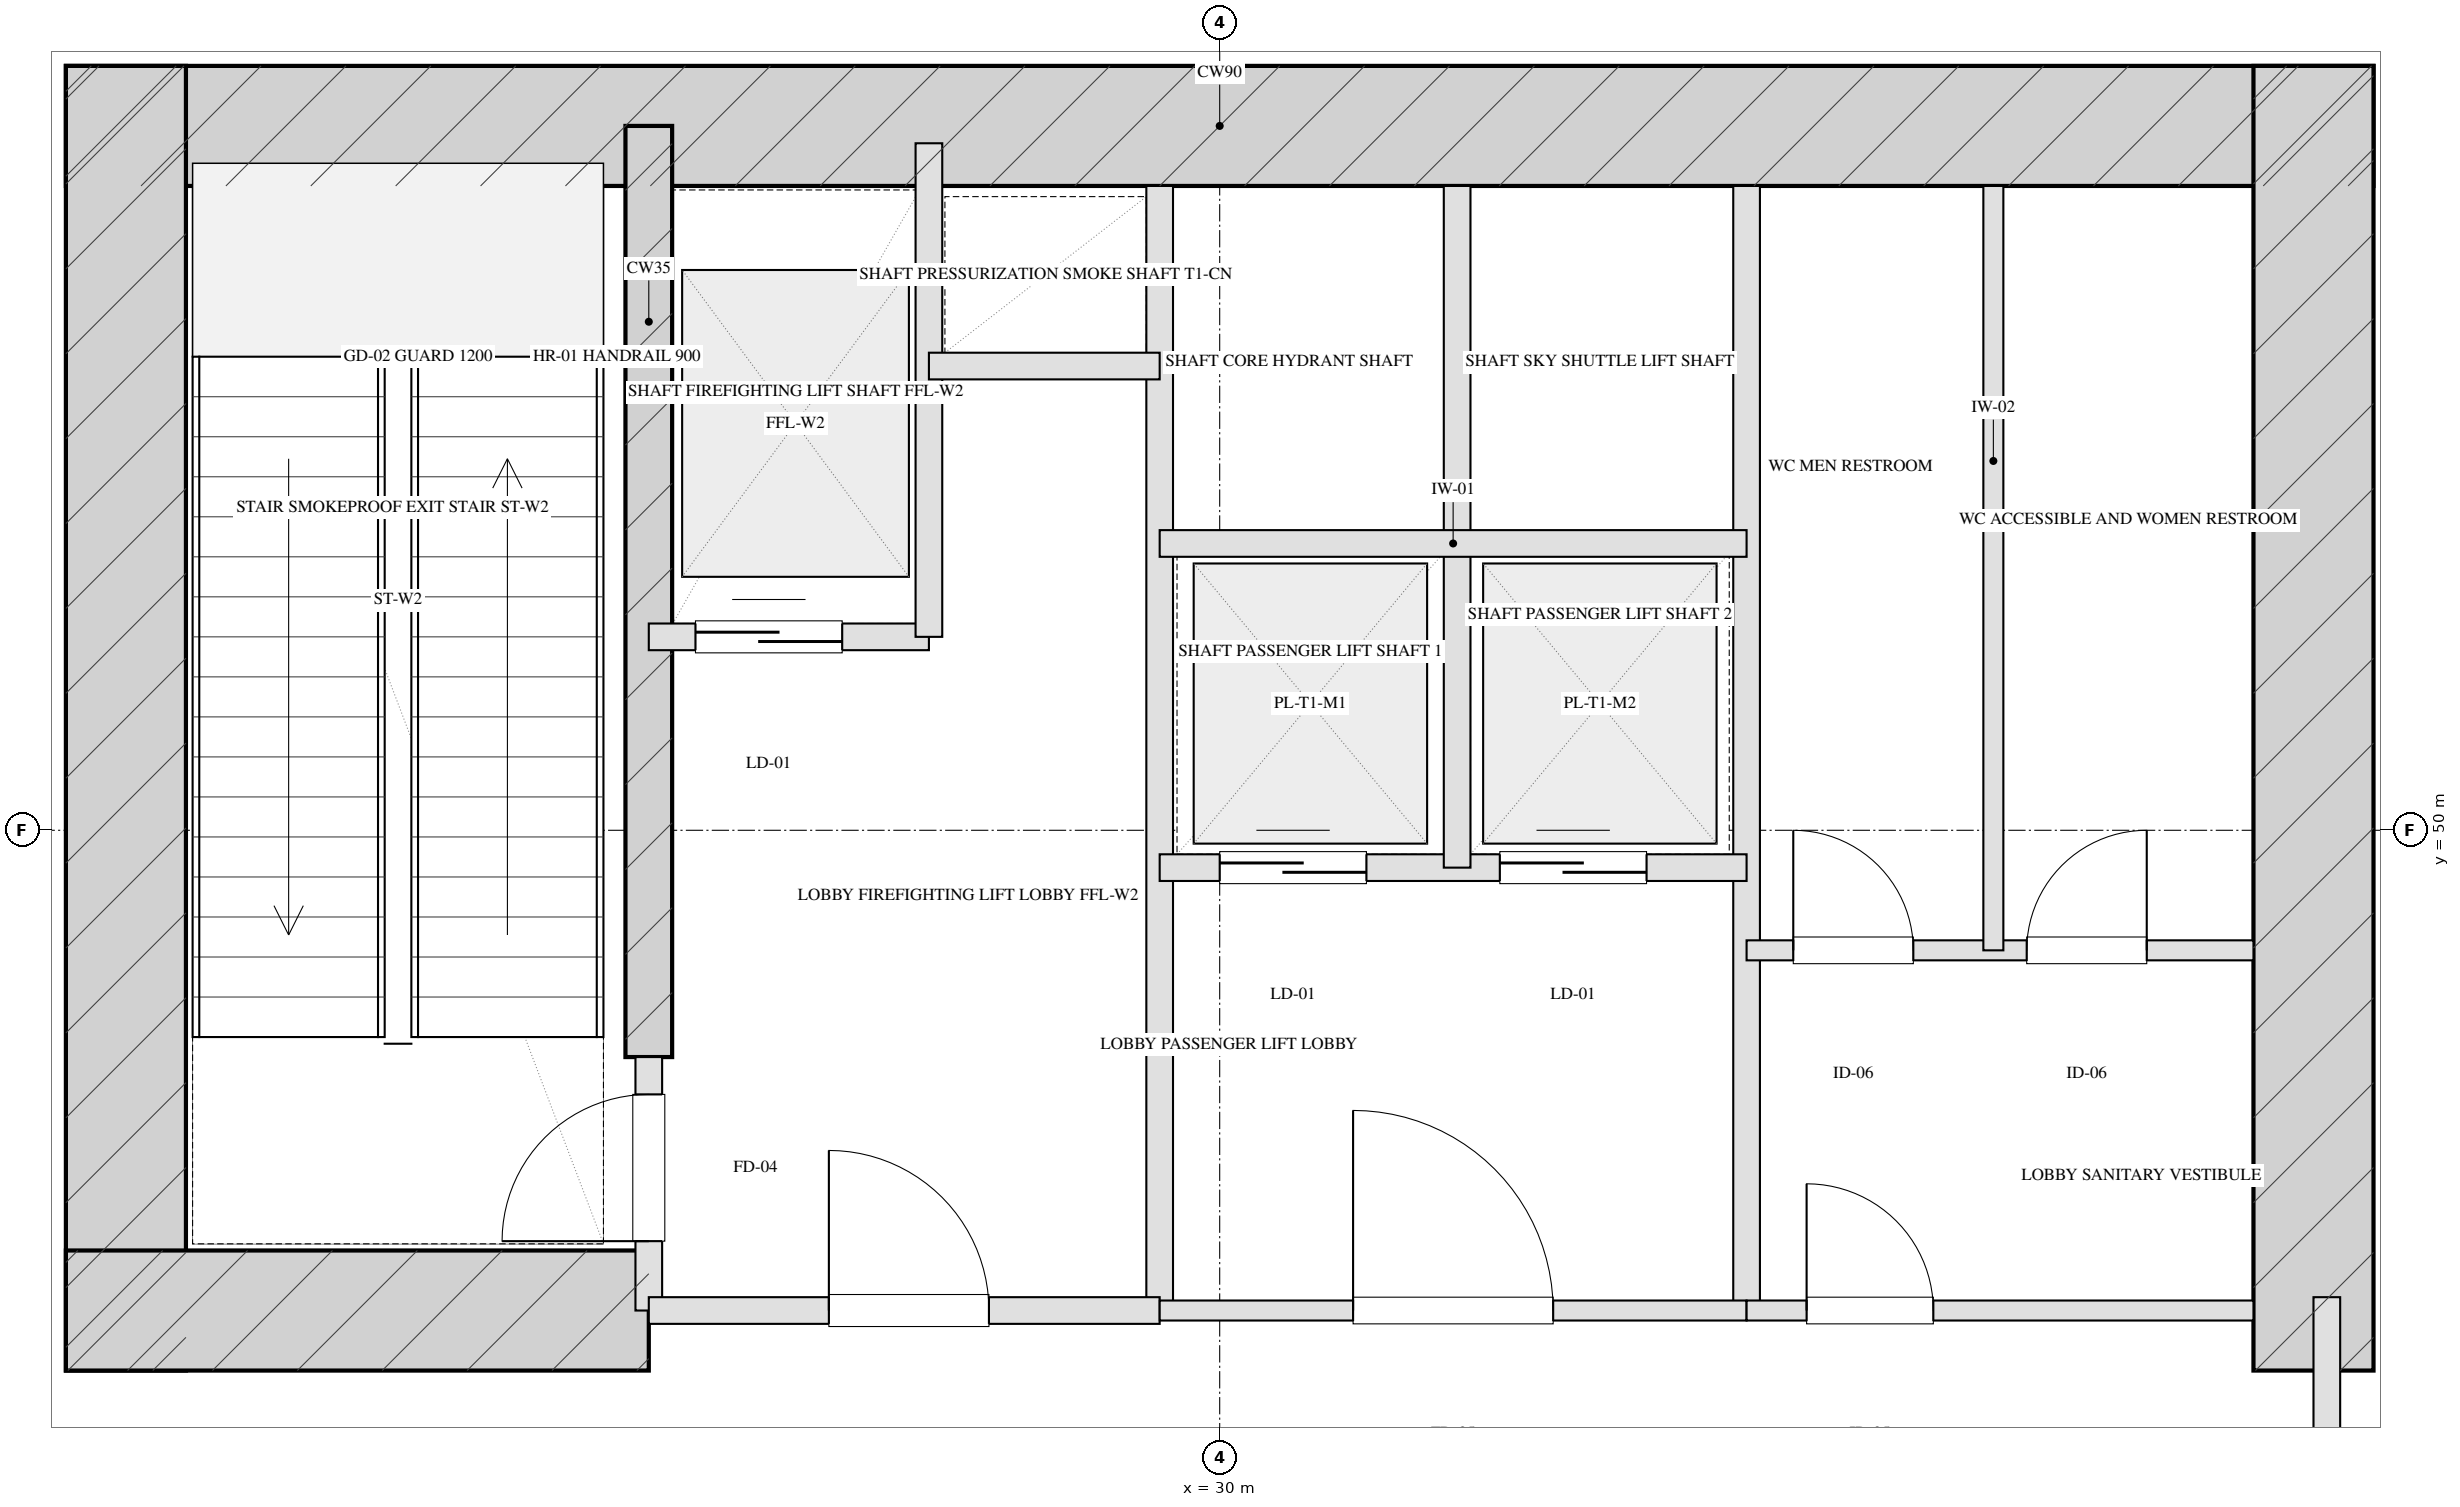
"""IFC4 building model, lengths in metres.
Left out: names, types, materials, properties, quantities, classifications, styles, units other than length and angle.
Written with IfcOpenShell. Run it as: python <this file> out.ifc"""

import sys

from ifc_helpers import new_model, si_unit, direction, frame, frame_2d, origin, place, context, subcontext, project, spatial, rectangle, extrude, element, fill, save


model = new_model("IFC4")
c1 = context("Model", 3, precision=1e-05, world=origin(), true_north=direction((0.0, 1.0)))
c2 = subcontext(c1, "Body", "Model", "MODEL_VIEW")
j1 = project(units=[si_unit("LENGTHUNIT", "METRE"), si_unit("PLANEANGLEUNIT", "RADIAN")], contexts=[c1])
p1 = place(None, origin())
s1 = spatial("IfcSite", under=j1, at=p1, CompositionType="ELEMENT")
p2 = place(p1, origin())
s2 = spatial("IfcBuilding", under=s1, at=p2, CompositionType="ELEMENT")
p3 = place(p2, origin())
s3 = spatial("IfcBuildingStorey", under=s2, at=p3, CompositionType="ELEMENT", Elevation=0.0)
p4 = place(p3, frame((21.35, 55.28, 0.0), z_axis=(0.0, 0.0, 1.0), x_axis=(1.0, 0.0, 0.0)))
e1 = element("IfcWall", 1, at=p4, inside=s3, PredefinedType="SHEAR", context=c2, shape_type="SweptSolid", body=[
    extrude(rectangle(XDim=17.3, YDim=0.9, at=frame_2d((8.65, 0.0))), origin(), (0.0, 0.0, 1.0), 6.0),
])
for number, where, z_axis, x_axis in (
    (2, (21.8, 45.95, 0.0), (0.0, 0.0, 1.0), (0.0, 1.0, 0.0)),
    (3, (38.2, 45.95, 0.0), (0.0, 0.0, 1.0), (0.0, 1.0, 0.0)),
):
    element("IfcWall", number, at=place(p3, frame(where, z_axis=z_axis, x_axis=x_axis)), inside=s3, PredefinedType="SHEAR", context=c2, shape_type="SweptSolid", body=[
        extrude(rectangle(XDim=9.78, YDim=0.9, at=frame_2d((4.89, 0.0))), origin(), (0.0, 0.0, 1.0), 6.0),
    ])
p5 = place(p3, frame((25.72, 48.3, 0.0), z_axis=(0.0, 0.0, 1.0), x_axis=(0.0, 1.0, 0.0)))
e4 = element("IfcWall", 4, at=p5, inside=s3, PredefinedType="SHEAR", context=c2, shape_type="SweptSolid", body=[
    extrude(rectangle(XDim=6.98, YDim=0.35, at=frame_2d((3.49, 0.0))), origin(), (0.0, 0.0, 1.0), 6.0),
])
p6 = place(p3, frame((21.35, 46.4, 0.0), z_axis=(0.0, 0.0, 1.0), x_axis=(1.0, 0.0, 0.0)))
e5 = element("IfcWall", 5, at=p6, inside=s3, PredefinedType="SHEAR", context=c2, shape_type="SweptSolid", body=[
    extrude(rectangle(XDim=4.37, YDim=0.9, at=frame_2d((2.185, 0.0))), origin(), (0.0, 0.0, 1.0), 6.0),
])
p7 = place(p3, frame((25.72, 46.4, 0.0), z_axis=(0.0, 0.0, 1.0), x_axis=(0.0, 1.0, 0.0)))
e6 = element("IfcWall", 6, at=p7, inside=s3, PredefinedType="PARTITIONING", context=c2, shape_type="SweptSolid", body=[
    extrude(rectangle(XDim=1.9, YDim=0.2, at=frame_2d((0.95, 0.0))), origin(), (0.0, 0.0, 1.0), 5.685),
])
p8 = place(p7, frame((0.52, 0.0, 0.0)))
e7 = element("IfcOpeningElement", 7, at=p8, cuts=e6, PredefinedType="OPENING", context=c2, shape_type="SweptSolid", body=[
    extrude(rectangle(XDim=1.1, YDim=2.05, at=frame_2d((0.55, 1.025))), frame((0.0, 0.11, 0.0), z_axis=(0.0, -1.0, 0.0), x_axis=(1.0, 0.0, 0.0)), (0.0, 0.0, 1.0), 0.22),
])
p9 = place(p3, frame((29.55, 46.4, 0.0), z_axis=(0.0, 0.0, 1.0), x_axis=(0.0, 1.0, 0.0)))
e8 = element("IfcWall", 8, at=p9, inside=s3, PredefinedType="PARTITIONING", context=c2, shape_type="SweptSolid", body=[
    extrude(rectangle(XDim=8.43, YDim=0.2, at=frame_2d((4.215, 0.0))), origin(), (0.0, 0.0, 1.0), 5.685),
])
p10 = place(p3, frame((25.72, 46.4, 0.0), z_axis=(0.0, 0.0, 1.0), x_axis=(1.0, 0.0, 0.0)))
e9 = element("IfcWall", 9, at=p10, inside=s3, PredefinedType="PARTITIONING", context=c2, shape_type="SweptSolid", body=[
    extrude(rectangle(XDim=3.83, YDim=0.2, at=frame_2d((1.915, 0.0))), origin(), (0.0, 0.0, 1.0), 5.685),
])
p11 = place(p10, frame((1.35, 0.0, 0.0)))
e10 = element("IfcOpeningElement", 10, at=p11, cuts=e9, PredefinedType="OPENING", context=c2, shape_type="SweptSolid", body=[
    extrude(rectangle(XDim=1.2, YDim=2.05, at=frame_2d((0.6, 1.025))), frame((0.0, 0.11, 0.0), z_axis=(0.0, -1.0, 0.0), x_axis=(1.0, 0.0, 0.0)), (0.0, 0.0, 1.0), 0.22),
])
p12 = place(p3, frame((25.72, 51.45, 0.0), z_axis=(0.0, 0.0, 1.0), x_axis=(1.0, 0.0, 0.0)))
e11 = element("IfcWall", 11, at=p12, inside=s3, PredefinedType="PARTITIONING", context=c2, shape_type="SweptSolid", body=[
    extrude(rectangle(XDim=2.1, YDim=0.2, at=frame_2d((1.05, 0.0))), origin(), (0.0, 0.0, 1.0), 5.685),
])
p13 = place(p12, frame((0.35, 0.0, 0.0)))
e12 = element("IfcOpeningElement", 12, at=p13, cuts=e11, PredefinedType="OPENING", context=c2, shape_type="SweptSolid", body=[
    extrude(rectangle(XDim=1.1, YDim=2.05, at=frame_2d((0.55, 1.025))), frame((0.0, 0.11, 0.0), z_axis=(0.0, -1.0, 0.0), x_axis=(1.0, 0.0, 0.0)), (0.0, 0.0, 1.0), 0.22),
])
p14 = place(p3, frame((27.82, 51.45, 0.0), z_axis=(0.0, 0.0, 1.0), x_axis=(0.0, 1.0, 0.0)))
e13 = element("IfcWall", 13, at=p14, inside=s3, PredefinedType="PARTITIONING", context=c2, shape_type="SweptSolid", body=[
    extrude(rectangle(XDim=3.7, YDim=0.2, at=frame_2d((1.85, 0.0))), origin(), (0.0, 0.0, 1.0), 5.685),
])
p15 = place(p3, frame((27.82, 53.48, 0.0), z_axis=(0.0, 0.0, 1.0), x_axis=(1.0, 0.0, 0.0)))
e14 = element("IfcWall", 14, at=p15, inside=s3, PredefinedType="PARTITIONING", context=c2, shape_type="SweptSolid", body=[
    extrude(rectangle(XDim=1.73, YDim=0.2, at=frame_2d((0.865, 0.0))), origin(), (0.0, 0.0, 1.0), 5.685),
])
p16 = place(p3, frame((33.95, 46.4, 0.0), z_axis=(0.0, 0.0, 1.0), x_axis=(0.0, 1.0, 0.0)))
e15 = element("IfcWall", 15, at=p16, inside=s3, PredefinedType="PARTITIONING", context=c2, shape_type="SweptSolid", body=[
    extrude(rectangle(XDim=8.43, YDim=0.2, at=frame_2d((4.215, 0.0))), origin(), (0.0, 0.0, 1.0), 5.685),
])
p17 = place(p3, frame((29.55, 46.4, 0.0), z_axis=(0.0, 0.0, 1.0), x_axis=(1.0, 0.0, 0.0)))
e16 = element("IfcWall", 16, at=p17, inside=s3, PredefinedType="PARTITIONING", context=c2, shape_type="SweptSolid", body=[
    extrude(rectangle(XDim=4.4, YDim=0.15, at=frame_2d((2.2, 0.0))), origin(), (0.0, 0.0, 1.0), 5.685),
])
p18 = place(p17, frame((1.45, 0.0, 0.0)))
e17 = element("IfcOpeningElement", 17, at=p18, cuts=e16, PredefinedType="OPENING", context=c2, shape_type="SweptSolid", body=[
    extrude(rectangle(XDim=1.5, YDim=2.05, at=frame_2d((0.75, 1.025))), frame((0.0, 0.085, 0.0), z_axis=(0.0, -1.0, 0.0), x_axis=(1.0, 0.0, 0.0)), (0.0, 0.0, 1.0), 0.17),
])
p19 = place(p3, frame((29.55, 49.72, 0.0), z_axis=(0.0, 0.0, 1.0), x_axis=(1.0, 0.0, 0.0)))
e18 = element("IfcWall", 18, at=p19, inside=s3, PredefinedType="PARTITIONING", context=c2, shape_type="SweptSolid", body=[
    extrude(rectangle(XDim=4.4, YDim=0.2, at=frame_2d((2.2, 0.0))), origin(), (0.0, 0.0, 1.0), 5.685),
])
p20 = place(p19, frame((0.45, 0.0, 0.0)))
e19 = element("IfcOpeningElement", 19, at=p20, cuts=e18, PredefinedType="OPENING", context=c2, shape_type="SweptSolid", body=[
    extrude(rectangle(XDim=1.1, YDim=2.05, at=frame_2d((0.55, 1.025))), frame((0.0, 0.11, 0.0), z_axis=(0.0, -1.0, 0.0), x_axis=(1.0, 0.0, 0.0)), (0.0, 0.0, 1.0), 0.22),
])
p21 = place(p19, frame((2.55, 0.0, 0.0)))
e20 = element("IfcOpeningElement", 20, at=p21, cuts=e18, PredefinedType="OPENING", context=c2, shape_type="SweptSolid", body=[
    extrude(rectangle(XDim=1.1, YDim=2.05, at=frame_2d((0.55, 1.025))), frame((0.0, 0.11, 0.0), z_axis=(0.0, -1.0, 0.0), x_axis=(1.0, 0.0, 0.0)), (0.0, 0.0, 1.0), 0.22),
])
p22 = place(p3, frame((31.78, 49.72, 0.0), z_axis=(0.0, 0.0, 1.0), x_axis=(0.0, 1.0, 0.0)))
e21 = element("IfcWall", 21, at=p22, inside=s3, PredefinedType="PARTITIONING", context=c2, shape_type="SweptSolid", body=[
    extrude(rectangle(XDim=5.11, YDim=0.2, at=frame_2d((2.555, 0.0))), origin(), (0.0, 0.0, 1.0), 5.685),
])
p23 = place(p3, frame((29.55, 52.15, 0.0), z_axis=(0.0, 0.0, 1.0), x_axis=(1.0, 0.0, 0.0)))
e22 = element("IfcWall", 22, at=p23, inside=s3, PredefinedType="PARTITIONING", context=c2, shape_type="SweptSolid", body=[
    extrude(rectangle(XDim=4.4, YDim=0.2, at=frame_2d((2.2, 0.0))), origin(), (0.0, 0.0, 1.0), 5.685),
])
p24 = place(p3, frame((33.95, 46.4, 0.0), z_axis=(0.0, 0.0, 1.0), x_axis=(1.0, 0.0, 0.0)))
e23 = element("IfcWall", 23, at=p24, inside=s3, PredefinedType="PARTITIONING", context=c2, shape_type="SweptSolid", body=[
    extrude(rectangle(XDim=3.8, YDim=0.15, at=frame_2d((1.9, 0.0))), origin(), (0.0, 0.0, 1.0), 5.685),
])
p25 = place(p24, frame((0.45, 0.0, 0.0)))
e24 = element("IfcOpeningElement", 24, at=p25, cuts=e23, PredefinedType="OPENING", context=c2, shape_type="SweptSolid", body=[
    extrude(rectangle(XDim=0.95, YDim=2.05, at=frame_2d((0.475, 1.025))), frame((0.0, 0.085, 0.0), z_axis=(0.0, -1.0, 0.0), x_axis=(1.0, 0.0, 0.0)), (0.0, 0.0, 1.0), 0.17),
])
p26 = place(p3, frame((33.95, 49.1, 0.0), z_axis=(0.0, 0.0, 1.0), x_axis=(1.0, 0.0, 0.0)))
e25 = element("IfcWall", 25, at=p26, inside=s3, PredefinedType="PARTITIONING", context=c2, shape_type="SweptSolid", body=[
    extrude(rectangle(XDim=3.8, YDim=0.15, at=frame_2d((1.9, 0.0))), origin(), (0.0, 0.0, 1.0), 5.685),
])
p27 = place(p26, frame((0.35, 0.0, 0.0)))
e26 = element("IfcOpeningElement", 26, at=p27, cuts=e25, PredefinedType="OPENING", context=c2, shape_type="SweptSolid", body=[
    extrude(rectangle(XDim=0.9, YDim=2.05, at=frame_2d((0.45, 1.025))), frame((0.0, 0.085, 0.0), z_axis=(0.0, -1.0, 0.0), x_axis=(1.0, 0.0, 0.0)), (0.0, 0.0, 1.0), 0.17),
])
p28 = place(p26, frame((2.1, 0.0, 0.0)))
e27 = element("IfcOpeningElement", 27, at=p28, cuts=e25, PredefinedType="OPENING", context=c2, shape_type="SweptSolid", body=[
    extrude(rectangle(XDim=0.9, YDim=2.05, at=frame_2d((0.45, 1.025))), frame((0.0, 0.085, 0.0), z_axis=(0.0, -1.0, 0.0), x_axis=(1.0, 0.0, 0.0)), (0.0, 0.0, 1.0), 0.17),
])
p29 = place(p3, frame((35.8, 49.1, 0.0), z_axis=(0.0, 0.0, 1.0), x_axis=(0.0, 1.0, 0.0)))
e28 = element("IfcWall", 28, at=p29, inside=s3, PredefinedType="PARTITIONING", context=c2, shape_type="SweptSolid", body=[
    extrude(rectangle(XDim=5.73, YDim=0.15, at=frame_2d((2.865, 0.0))), origin(), (0.0, 0.0, 1.0), 5.685),
])
p30 = place(p3, frame((38.3, 43.75, 0.0), z_axis=(0.0, 0.0, 1.0), x_axis=(0.0, 1.0, 0.0)))
e29 = element("IfcWall", 29, at=p30, inside=s3, PredefinedType="PARTITIONING", context=c2, shape_type="SweptSolid", body=[
    extrude(rectangle(XDim=2.75, YDim=0.2, at=frame_2d((1.375, 0.0))), origin(), (0.0, 0.0, 1.0), 5.685),
])
p31 = place(p8, origin())
e30 = element("IfcDoor", 30, at=p31, inside=s3, OperationType="SINGLE_SWING_LEFT", PredefinedType="DOOR", context=c2, shape_type="SweptSolid", body=[
    extrude(rectangle(XDim=1.1, YDim=2.05, at=frame_2d((0.55, 1.025))), frame((0.0, 0.025, 0.0), z_axis=(0.0, -1.0, 0.0), x_axis=(1.0, 0.0, 0.0)), (0.0, 0.0, 1.0), 0.05),
])
fill(e7, e30)
p32 = place(p11, origin())
e31 = element("IfcDoor", 31, at=p32, inside=s3, OperationType="SINGLE_SWING_LEFT", PredefinedType="DOOR", context=c2, shape_type="SweptSolid", body=[
    extrude(rectangle(XDim=1.2, YDim=2.05, at=frame_2d((0.6, 1.025))), frame((0.0, 0.025, 0.0), z_axis=(0.0, -1.0, 0.0), x_axis=(1.0, 0.0, 0.0)), (0.0, 0.0, 1.0), 0.05),
])
fill(e10, e31)
p33 = place(p13, origin())
e32 = element("IfcDoor", 32, at=p33, inside=s3, OperationType="DOUBLE_DOOR_SLIDING", PredefinedType="DOOR", context=c2, shape_type="SweptSolid", body=[
    extrude(rectangle(XDim=1.1, YDim=2.05, at=frame_2d((0.55, 1.025))), frame((0.0, 0.025, 0.0), z_axis=(0.0, -1.0, 0.0), x_axis=(1.0, 0.0, 0.0)), (0.0, 0.0, 1.0), 0.05),
])
fill(e12, e32)
p34 = place(p18, origin())
e33 = element("IfcDoor", 33, at=p34, inside=s3, OperationType="SINGLE_SWING_LEFT", PredefinedType="DOOR", context=c2, shape_type="SweptSolid", body=[
    extrude(rectangle(XDim=1.5, YDim=2.05, at=frame_2d((0.75, 1.025))), frame((0.0, 0.025, 0.0), z_axis=(0.0, -1.0, 0.0), x_axis=(1.0, 0.0, 0.0)), (0.0, 0.0, 1.0), 0.05),
])
fill(e17, e33)
p35 = place(p20, origin())
e34 = element("IfcDoor", 34, at=p35, inside=s3, OperationType="DOUBLE_DOOR_SLIDING", PredefinedType="DOOR", context=c2, shape_type="SweptSolid", body=[
    extrude(rectangle(XDim=1.1, YDim=2.05, at=frame_2d((0.55, 1.025))), frame((0.0, 0.025, 0.0), z_axis=(0.0, -1.0, 0.0), x_axis=(1.0, 0.0, 0.0)), (0.0, 0.0, 1.0), 0.05),
])
fill(e19, e34)
p36 = place(p21, origin())
e35 = element("IfcDoor", 35, at=p36, inside=s3, OperationType="DOUBLE_DOOR_SLIDING", PredefinedType="DOOR", context=c2, shape_type="SweptSolid", body=[
    extrude(rectangle(XDim=1.1, YDim=2.05, at=frame_2d((0.55, 1.025))), frame((0.0, 0.025, 0.0), z_axis=(0.0, -1.0, 0.0), x_axis=(1.0, 0.0, 0.0)), (0.0, 0.0, 1.0), 0.05),
])
fill(e20, e35)
p37 = place(p25, origin())
e36 = element("IfcDoor", 36, at=p37, inside=s3, OperationType="SINGLE_SWING_LEFT", PredefinedType="DOOR", context=c2, shape_type="SweptSolid", body=[
    extrude(rectangle(XDim=0.95, YDim=2.05, at=frame_2d((0.475, 1.025))), frame((0.0, 0.025, 0.0), z_axis=(0.0, -1.0, 0.0), x_axis=(1.0, 0.0, 0.0)), (0.0, 0.0, 1.0), 0.05),
])
fill(e24, e36)
p38 = place(p27, origin())
e37 = element("IfcDoor", 37, at=p38, inside=s3, OperationType="SINGLE_SWING_LEFT", PredefinedType="DOOR", context=c2, shape_type="SweptSolid", body=[
    extrude(rectangle(XDim=0.9, YDim=2.05, at=frame_2d((0.45, 1.025))), frame((0.0, 0.025, 0.0), z_axis=(0.0, -1.0, 0.0), x_axis=(1.0, 0.0, 0.0)), (0.0, 0.0, 1.0), 0.05),
])
fill(e26, e37)
p39 = place(p28, origin())
e38 = element("IfcDoor", 38, at=p39, inside=s3, OperationType="SINGLE_SWING_RIGHT", PredefinedType="DOOR", context=c2, shape_type="SweptSolid", body=[
    extrude(rectangle(XDim=0.9, YDim=2.05, at=frame_2d((0.45, 1.025))), frame((0.0, 0.025, 0.0), z_axis=(0.0, -1.0, 0.0), x_axis=(1.0, 0.0, 0.0)), (0.0, 0.0, 1.0), 0.05),
])
fill(e27, e38)
save(model, sys.argv[1])
